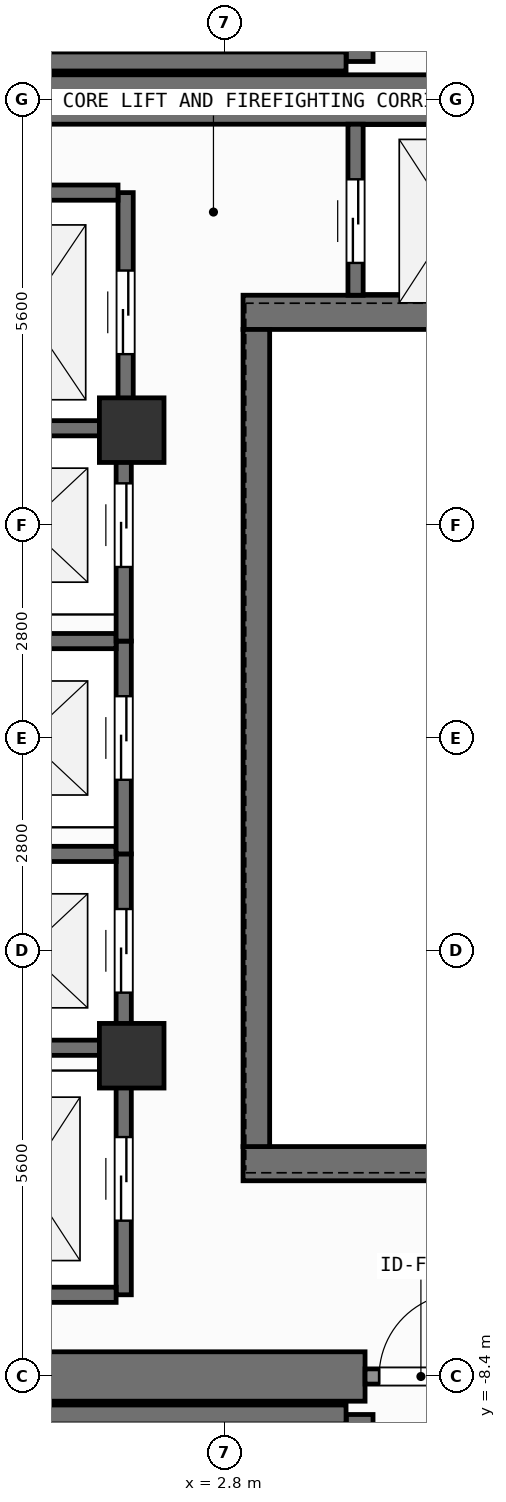
"""IFC4 building model, lengths in metres.
Left out: names, types, materials, properties, quantities, classifications, styles, units other than length and angle.
Written with IfcOpenShell. Run it as: python <this file> out.ifc"""

import sys

from ifc_helpers import new_model, si_unit, direction, frame, frame_2d, origin, origin_2d, place, context, subcontext, project, spatial, rectangle, extrude, element, fill, save


model = new_model("IFC4")
c1 = context("Model", 3, precision=1e-05, world=origin(), true_north=direction((0.0, 1.0)))
c2 = subcontext(c1, "Body", "Model", "MODEL_VIEW")
j1 = project(units=[si_unit("LENGTHUNIT", "METRE"), si_unit("PLANEANGLEUNIT", "RADIAN")], contexts=[c1])
p1 = place(None, origin())
s1 = spatial("IfcSite", under=j1, at=p1, CompositionType="ELEMENT")
p2 = place(p1, origin())
s2 = spatial("IfcBuilding", under=s1, at=p2, CompositionType="ELEMENT")
p3 = place(p2, frame((0.0, 0.0, 309.3)))
s3 = spatial("IfcBuildingStorey", under=s2, at=p3, CompositionType="ELEMENT", Elevation=309.3)
p4 = place(p3, frame((-2.62, -8.4, 0.0), z_axis=(0.0, 0.0, 1.0), x_axis=(1.0, 0.0, 0.0)))
e1 = element("IfcWall", 1, at=p4, inside=s3, PredefinedType="SHEAR", context=c2, shape_type="SweptSolid", body=[
    extrude(rectangle(XDim=7.27, YDim=0.65, at=frame_2d((3.635, 0.0))), origin(), (0.0, 0.0, 1.0), 3.9),
])
p5 = place(p3, frame((-7.55, 8.4, 0.0), z_axis=(0.0, 0.0, 1.0), x_axis=(1.0, 0.0, 0.0)))
e2 = element("IfcWall", 2, at=p5, inside=s3, PredefinedType="SHEAR", context=c2, shape_type="SweptSolid", body=[
    extrude(rectangle(XDim=16.275, YDim=0.65, at=frame_2d((8.138, 0.0))), origin(), (0.0, 0.0, 1.0), 3.9),
])
for number, where, z_axis, x_axis in (
    (3, (3.045, -5.6, 0.0), (0.0, 0.0, 1.0), (1.0, 0.0, 0.0)),
    (4, (3.045, 5.6, 0.0), (0.0, 0.0, 1.0), (1.0, 0.0, 0.0)),
):
    element("IfcWall", number, at=place(p3, frame(where, z_axis=z_axis, x_axis=x_axis)), inside=s3, PredefinedType="SHEAR", context=c2, shape_type="SweptSolid", body=[
        extrude(rectangle(XDim=5.68, YDim=0.45, at=frame_2d((2.84, 0.0))), origin(), (0.0, 0.0, 1.0), 3.9),
    ])
p6 = place(p3, frame((3.22, -5.375, 0.0), z_axis=(0.0, 0.0, 1.0), x_axis=(0.0, 1.0, 0.0)))
e5 = element("IfcWall", 5, at=p6, inside=s3, PredefinedType="SHEAR", context=c2, shape_type="SweptSolid", body=[
    extrude(rectangle(XDim=10.75, YDim=0.35, at=frame_2d((5.375, 0.0))), origin(), (0.0, 0.0, 1.0), 3.9),
])
p7 = place(p3, frame((-2.2, -8.9, 0.0), z_axis=(0.0, 0.0, 1.0), x_axis=(1.0, 0.0, 0.0)))
e6 = element("IfcWall", 6, at=p7, inside=s3, PredefinedType="SHEAR", context=c2, shape_type="SweptSolid", body=[
    extrude(rectangle(XDim=6.6, YDim=0.25, at=frame_2d((3.3, 0.0))), origin(), (0.0, 0.0, 1.0), 3.9),
])
p8 = place(p3, frame((4.58, -8.9, 0.0), z_axis=(0.0, 0.0, 1.0), x_axis=(0.0, -1.0, 0.0)))
e7 = element("IfcWall", 7, at=p8, inside=s3, PredefinedType="SHEAR", context=c2, shape_type="SweptSolid", body=[
    extrude(rectangle(XDim=2.925, YDim=0.35, at=frame_2d((1.462, 0.0))), origin(), (0.0, 0.0, 1.0), 3.9),
])
p9 = place(p8, frame((0.913, 0.0, 0.0)))
e8 = element("IfcOpeningElement", 8, at=p9, cuts=e7, PredefinedType="OPENING", context=c2, shape_type="SweptSolid", body=[
    extrude(rectangle(XDim=1.1, YDim=2.15, at=frame_2d((0.55, 1.075))), frame((0.0, 0.185, 0.0), z_axis=(0.0, -1.0, 0.0), x_axis=(1.0, 0.0, 0.0)), (0.0, 0.0, 1.0), 0.37),
])
p10 = place(p3, frame((-2.2, 8.9, 0.0), z_axis=(0.0, 0.0, 1.0), x_axis=(1.0, 0.0, 0.0)))
e9 = element("IfcWall", 9, at=p10, inside=s3, PredefinedType="SHEAR", context=c2, shape_type="SweptSolid", body=[
    extrude(rectangle(XDim=6.6, YDim=0.25, at=frame_2d((3.3, 0.0))), origin(), (0.0, 0.0, 1.0), 3.9),
])
p11 = place(p3, frame((4.58, 11.825, 0.0), z_axis=(0.0, 0.0, 1.0), x_axis=(0.0, -1.0, 0.0)))
e10 = element("IfcWall", 10, at=p11, inside=s3, PredefinedType="SHEAR", context=c2, shape_type="SweptSolid", body=[
    extrude(rectangle(XDim=2.925, YDim=0.35, at=frame_2d((1.462, 0.0))), origin(), (0.0, 0.0, 1.0), 3.9),
])
p12 = place(p11, frame((0.913, 0.0, 0.0)))
e11 = element("IfcOpeningElement", 11, at=p12, cuts=e10, PredefinedType="OPENING", context=c2, shape_type="SweptSolid", body=[
    extrude(rectangle(XDim=1.1, YDim=2.15, at=frame_2d((0.55, 1.075))), frame((0.0, 0.185, 0.0), z_axis=(0.0, -1.0, 0.0), x_axis=(1.0, 0.0, 0.0)), (0.0, 0.0, 1.0), 0.37),
])
for number, where, z_axis, x_axis in (
    (12, (1.58, -4.18, 0.0), (0.0, 0.0, 1.0), (1.0, 0.0, 0.0)),
    (13, (1.58, 4.05, 0.0), (0.0, 0.0, 1.0), (1.0, 0.0, 0.0)),
):
    element("IfcColumn", number, at=place(p3, frame(where, z_axis=z_axis, x_axis=x_axis)), inside=s3, PredefinedType="COLUMN", context=c2, shape_type="SweptSolid", body=[
        extrude(rectangle(XDim=0.85, YDim=0.85, at=origin_2d()), origin(), (0.0, 0.0, 1.0), 3.9),
    ])
p13 = place(p3, frame((1.475, -4.275, 0.0), z_axis=(0.0, 0.0, 1.0), x_axis=(0.0, 1.0, 0.0)))
e14 = element("IfcWall", 14, at=p13, inside=s3, PredefinedType="SHEAR", context=c2, shape_type="SweptSolid", body=[
    extrude(rectangle(XDim=2.75, YDim=0.2, at=frame_2d((1.375, 0.0))), origin(), (0.0, 0.0, 1.0), 3.64),
])
p14 = place(p13, frame((0.925, 0.0, 0.0)))
e15 = element("IfcOpeningElement", 15, at=p14, cuts=e14, PredefinedType="OPENING", context=c2, shape_type="SweptSolid", body=[
    extrude(rectangle(XDim=1.1, YDim=2.2, at=frame_2d((0.55, 1.1))), frame((0.0, 0.11, 0.0), z_axis=(0.0, -1.0, 0.0), x_axis=(1.0, 0.0, 0.0)), (0.0, 0.0, 1.0), 0.22),
])
for number, where, z_axis, x_axis in (
    (16, (-0.975, -4.075, 0.0), (0.0, 0.0, 1.0), (1.0, 0.0, 0.0)),
    (17, (-0.975, -1.525, 0.0), (0.0, 0.0, 1.0), (1.0, 0.0, 0.0)),
):
    element("IfcWall", number, at=place(p3, frame(where, z_axis=z_axis, x_axis=x_axis)), inside=s3, PredefinedType="SHEAR", context=c2, shape_type="SweptSolid", body=[
        extrude(rectangle(XDim=2.35, YDim=0.2, at=frame_2d((1.175, 0.0))), origin(), (0.0, 0.0, 1.0), 3.64),
    ])
p15 = place(p3, frame((1.475, -1.525, 0.0), z_axis=(0.0, 0.0, 1.0), x_axis=(0.0, 1.0, 0.0)))
e18 = element("IfcWall", 18, at=p15, inside=s3, PredefinedType="SHEAR", context=c2, shape_type="SweptSolid", body=[
    extrude(rectangle(XDim=2.8, YDim=0.2, at=frame_2d((1.4, 0.0))), origin(), (0.0, 0.0, 1.0), 3.64),
])
p16 = place(p15, frame((0.975, 0.0, 0.0)))
e19 = element("IfcOpeningElement", 19, at=p16, cuts=e18, PredefinedType="OPENING", context=c2, shape_type="SweptSolid", body=[
    extrude(rectangle(XDim=1.1, YDim=2.2, at=frame_2d((0.55, 1.1))), frame((0.0, 0.11, 0.0), z_axis=(0.0, -1.0, 0.0), x_axis=(1.0, 0.0, 0.0)), (0.0, 0.0, 1.0), 0.22),
])
p17 = place(p3, frame((-0.975, 1.275, 0.0), z_axis=(0.0, 0.0, 1.0), x_axis=(1.0, 0.0, 0.0)))
e20 = element("IfcWall", 20, at=p17, inside=s3, PredefinedType="SHEAR", context=c2, shape_type="SweptSolid", body=[
    extrude(rectangle(XDim=2.35, YDim=0.2, at=frame_2d((1.175, 0.0))), origin(), (0.0, 0.0, 1.0), 3.64),
])
p18 = place(p3, frame((1.475, 1.275, 0.0), z_axis=(0.0, 0.0, 1.0), x_axis=(0.0, 1.0, 0.0)))
e21 = element("IfcWall", 21, at=p18, inside=s3, PredefinedType="SHEAR", context=c2, shape_type="SweptSolid", body=[
    extrude(rectangle(XDim=2.8, YDim=0.2, at=frame_2d((1.4, 0.0))), origin(), (0.0, 0.0, 1.0), 3.64),
])
p19 = place(p18, frame((0.975, 0.0, 0.0)))
e22 = element("IfcOpeningElement", 22, at=p19, cuts=e21, PredefinedType="OPENING", context=c2, shape_type="SweptSolid", body=[
    extrude(rectangle(XDim=1.1, YDim=2.2, at=frame_2d((0.55, 1.1))), frame((0.0, 0.11, 0.0), z_axis=(0.0, -1.0, 0.0), x_axis=(1.0, 0.0, 0.0)), (0.0, 0.0, 1.0), 0.22),
])
p20 = place(p3, frame((-0.975, 4.075, 0.0), z_axis=(0.0, 0.0, 1.0), x_axis=(1.0, 0.0, 0.0)))
e23 = element("IfcWall", 23, at=p20, inside=s3, PredefinedType="SHEAR", context=c2, shape_type="SweptSolid", body=[
    extrude(rectangle(XDim=2.35, YDim=0.2, at=frame_2d((1.175, 0.0))), origin(), (0.0, 0.0, 1.0), 3.64),
])
p21 = place(p3, frame((1.5, 4.025, 0.0), z_axis=(0.0, 0.0, 1.0), x_axis=(0.0, 1.0, 0.0)))
e24 = element("IfcWall", 24, at=p21, inside=s3, PredefinedType="SHEAR", context=c2, shape_type="SweptSolid", body=[
    extrude(rectangle(XDim=3.15, YDim=0.2, at=frame_2d((1.575, 0.0))), origin(), (0.0, 0.0, 1.0), 3.64),
])
p22 = place(p21, frame((1.025, 0.0, 0.0)))
e25 = element("IfcOpeningElement", 25, at=p22, cuts=e24, PredefinedType="OPENING", context=c2, shape_type="SweptSolid", body=[
    extrude(rectangle(XDim=1.1, YDim=2.2, at=frame_2d((0.55, 1.1))), frame((0.0, 0.11, 0.0), z_axis=(0.0, -1.0, 0.0), x_axis=(1.0, 0.0, 0.0)), (0.0, 0.0, 1.0), 0.22),
])
p23 = place(p3, frame((-1.0, 7.175, 0.0), z_axis=(0.0, 0.0, 1.0), x_axis=(1.0, 0.0, 0.0)))
e26 = element("IfcWall", 26, at=p23, inside=s3, PredefinedType="SHEAR", context=c2, shape_type="SweptSolid", body=[
    extrude(rectangle(XDim=2.4, YDim=0.2, at=frame_2d((1.2, 0.0))), origin(), (0.0, 0.0, 1.0), 3.64),
])
p24 = place(p3, frame((1.475, -7.325, 0.0), z_axis=(0.0, 0.0, 1.0), x_axis=(0.0, 1.0, 0.0)))
e27 = element("IfcWall", 27, at=p24, inside=s3, PredefinedType="SHEAR", context=c2, shape_type="SweptSolid", body=[
    extrude(rectangle(XDim=3.05, YDim=0.2, at=frame_2d((1.525, 0.0))), origin(), (0.0, 0.0, 1.0), 3.64),
])
p25 = place(p24, frame((0.975, 0.0, 0.0)))
e28 = element("IfcOpeningElement", 28, at=p25, cuts=e27, PredefinedType="OPENING", context=c2, shape_type="SweptSolid", body=[
    extrude(rectangle(XDim=1.1, YDim=2.2, at=frame_2d((0.55, 1.1))), frame((0.0, 0.11, 0.0), z_axis=(0.0, -1.0, 0.0), x_axis=(1.0, 0.0, 0.0)), (0.0, 0.0, 1.0), 0.22),
])
p26 = place(p3, frame((-0.975, -7.325, 0.0), z_axis=(0.0, 0.0, 1.0), x_axis=(1.0, 0.0, 0.0)))
e29 = element("IfcWall", 29, at=p26, inside=s3, PredefinedType="SHEAR", context=c2, shape_type="SweptSolid", body=[
    extrude(rectangle(XDim=2.35, YDim=0.2, at=frame_2d((1.175, 0.0))), origin(), (0.0, 0.0, 1.0), 3.64),
])
p27 = place(p3, frame((4.525, 5.825, 0.0), z_axis=(0.0, 0.0, 1.0), x_axis=(0.0, 1.0, 0.0)))
e30 = element("IfcWall", 30, at=p27, inside=s3, PredefinedType="SHEAR", context=c2, shape_type="SweptSolid", body=[
    extrude(rectangle(XDim=2.25, YDim=0.2, at=frame_2d((1.125, 0.0))), origin(), (0.0, 0.0, 1.0), 3.64),
])
p28 = place(p27, frame((0.425, 0.0, 0.0)))
e31 = element("IfcOpeningElement", 31, at=p28, cuts=e30, PredefinedType="OPENING", context=c2, shape_type="SweptSolid", body=[
    extrude(rectangle(XDim=1.1, YDim=2.2, at=frame_2d((0.55, 1.1))), frame((0.0, 0.11, 0.0), z_axis=(0.0, -1.0, 0.0), x_axis=(1.0, 0.0, 0.0)), (0.0, 0.0, 1.0), 0.22),
])
p29 = place(p3, frame((4.65, -8.4, 0.0), z_axis=(0.0, 0.0, 1.0), x_axis=(1.0, 0.0, 0.0)))
e32 = element("IfcWall", 32, at=p29, inside=s3, PredefinedType="SOLIDWALL", context=c2, shape_type="SweptSolid", body=[
    extrude(rectangle(XDim=1.47, YDim=0.2, at=frame_2d((0.735, 0.0))), origin(), (0.0, 0.0, 1.0), 2.88),
])
p30 = place(p29, frame((0.185, 0.0, 0.0)))
e33 = element("IfcOpeningElement", 33, at=p30, cuts=e32, PredefinedType="OPENING", context=c2, shape_type="SweptSolid", body=[
    extrude(rectangle(XDim=1.1, YDim=2.15, at=frame_2d((0.55, 1.075))), frame((0.0, 0.11, 0.0), z_axis=(0.0, -1.0, 0.0), x_axis=(1.0, 0.0, 0.0)), (0.0, 0.0, 1.0), 0.22),
])
p31 = place(p14, origin())
e34 = element("IfcDoor", 34, at=p31, inside=s3, OperationType="SLIDING_TO_LEFT", PredefinedType="DOOR", context=c2, shape_type="SweptSolid", body=[
    extrude(rectangle(XDim=1.1, YDim=2.2, at=frame_2d((0.55, 1.1))), frame((0.0, 0.025, 0.0), z_axis=(0.0, -1.0, 0.0), x_axis=(1.0, 0.0, 0.0)), (0.0, 0.0, 1.0), 0.05),
])
fill(e15, e34)
p32 = place(p16, origin())
e35 = element("IfcDoor", 35, at=p32, inside=s3, OperationType="SLIDING_TO_LEFT", PredefinedType="DOOR", context=c2, shape_type="SweptSolid", body=[
    extrude(rectangle(XDim=1.1, YDim=2.2, at=frame_2d((0.55, 1.1))), frame((0.0, 0.025, 0.0), z_axis=(0.0, -1.0, 0.0), x_axis=(1.0, 0.0, 0.0)), (0.0, 0.0, 1.0), 0.05),
])
fill(e19, e35)
p33 = place(p19, origin())
e36 = element("IfcDoor", 36, at=p33, inside=s3, OperationType="SLIDING_TO_LEFT", PredefinedType="DOOR", context=c2, shape_type="SweptSolid", body=[
    extrude(rectangle(XDim=1.1, YDim=2.2, at=frame_2d((0.55, 1.1))), frame((0.0, 0.025, 0.0), z_axis=(0.0, -1.0, 0.0), x_axis=(1.0, 0.0, 0.0)), (0.0, 0.0, 1.0), 0.05),
])
fill(e22, e36)
p34 = place(p22, origin())
e37 = element("IfcDoor", 37, at=p34, inside=s3, OperationType="SLIDING_TO_LEFT", PredefinedType="DOOR", context=c2, shape_type="SweptSolid", body=[
    extrude(rectangle(XDim=1.1, YDim=2.2, at=frame_2d((0.55, 1.1))), frame((0.0, 0.025, 0.0), z_axis=(0.0, -1.0, 0.0), x_axis=(1.0, 0.0, 0.0)), (0.0, 0.0, 1.0), 0.05),
])
fill(e25, e37)
p35 = place(p25, origin())
e38 = element("IfcDoor", 38, at=p35, inside=s3, OperationType="SLIDING_TO_LEFT", PredefinedType="DOOR", context=c2, shape_type="SweptSolid", body=[
    extrude(rectangle(XDim=1.1, YDim=2.2, at=frame_2d((0.55, 1.1))), frame((0.0, 0.025, 0.0), z_axis=(0.0, -1.0, 0.0), x_axis=(1.0, 0.0, 0.0)), (0.0, 0.0, 1.0), 0.05),
])
fill(e28, e38)
p36 = place(p28, origin())
e39 = element("IfcDoor", 39, at=p36, inside=s3, OperationType="SLIDING_TO_LEFT", PredefinedType="DOOR", context=c2, shape_type="SweptSolid", body=[
    extrude(rectangle(XDim=1.1, YDim=2.2, at=frame_2d((0.55, 1.1))), frame((0.0, 0.025, 0.0), z_axis=(0.0, -1.0, 0.0), x_axis=(1.0, 0.0, 0.0)), (0.0, 0.0, 1.0), 0.05),
])
fill(e31, e39)
p37 = place(p30, origin())
e40 = element("IfcDoor", 40, at=p37, inside=s3, OperationType="SINGLE_SWING_RIGHT", PredefinedType="DOOR", context=c2, shape_type="SweptSolid", body=[
    extrude(rectangle(XDim=1.1, YDim=2.15, at=frame_2d((0.55, 1.075))), frame((0.0, 0.025, 0.0), z_axis=(0.0, -1.0, 0.0), x_axis=(1.0, 0.0, 0.0)), (0.0, 0.0, 1.0), 0.05),
])
fill(e33, e40)
save(model, sys.argv[1])
